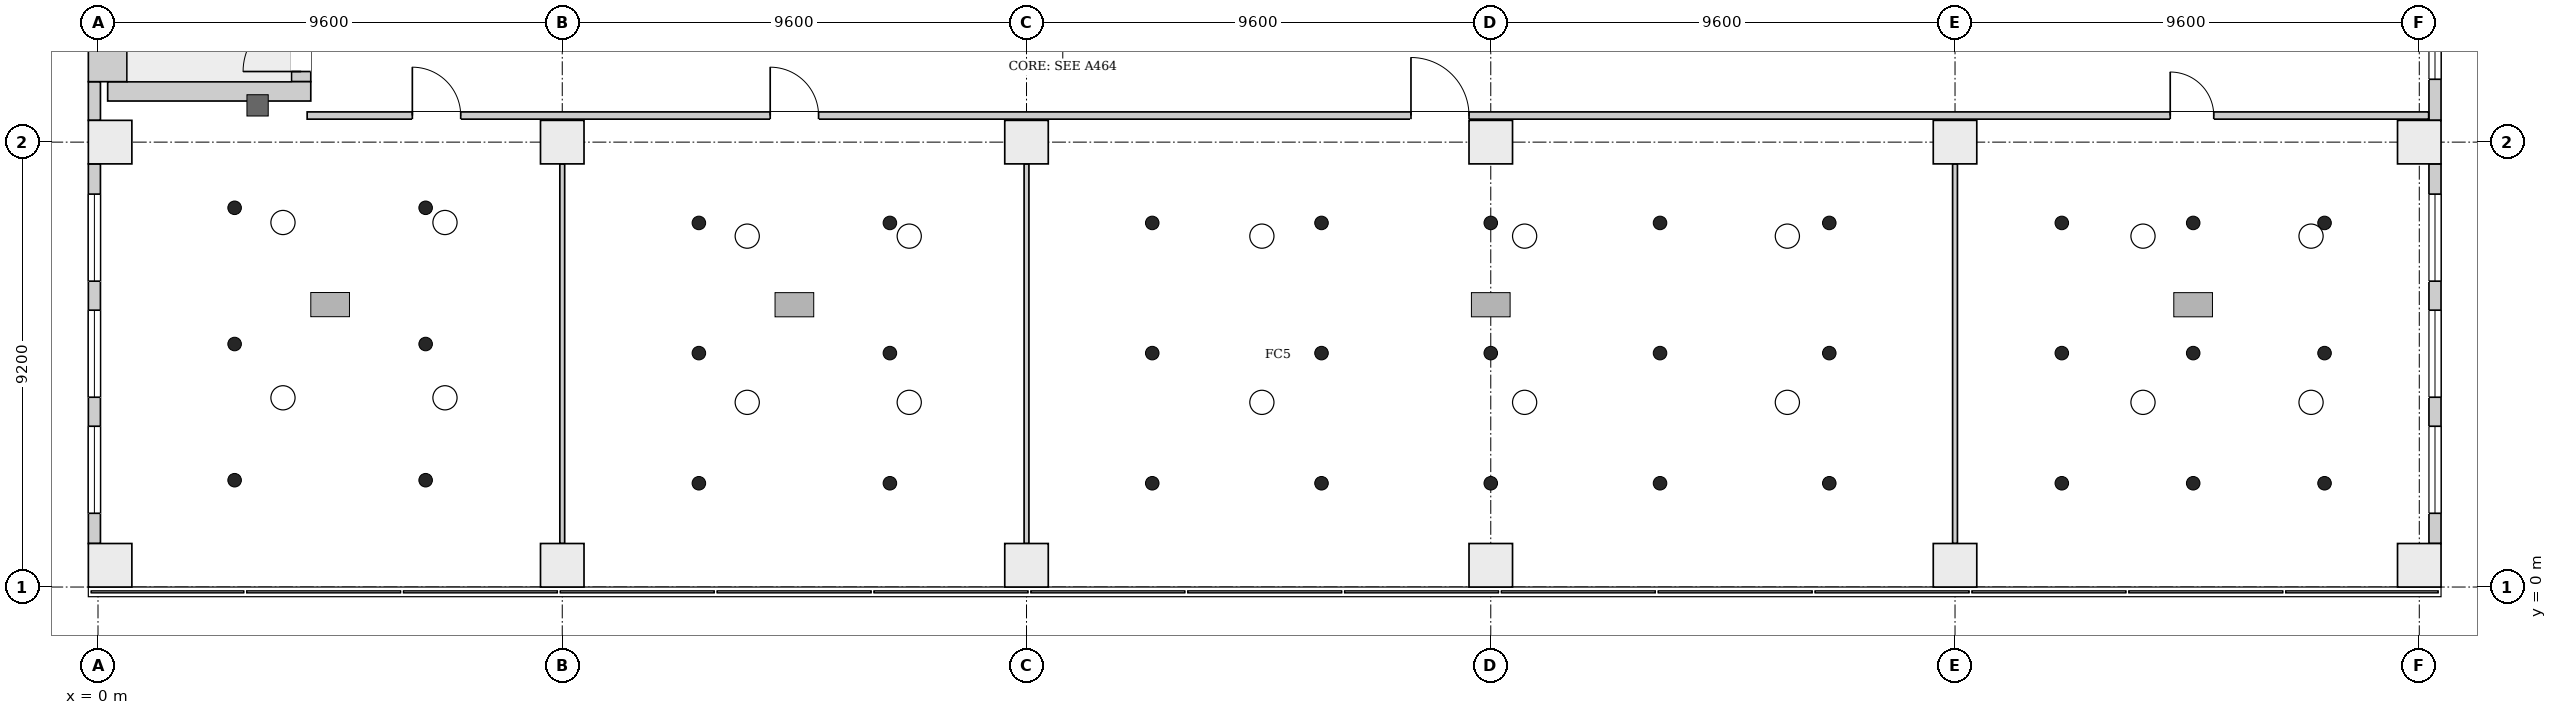
"""IFC4 building model, lengths in metres.
Left out: names, types, materials, properties, quantities, classifications, styles, units other than length and angle.
Written with IfcOpenShell. Run it as: python <this file> out.ifc"""

import sys

from ifc_helpers import new_model, si_unit, direction, frame, frame_2d, origin, origin_2d, place, context, subcontext, project, spatial, rectangle, extrude, element, fill, save


model = new_model("IFC4")
c1 = context("Model", 3, precision=1e-05, world=origin(), true_north=direction((0.0, 1.0)))
c2 = subcontext(c1, "Body", "Model", "MODEL_VIEW")
j1 = project(units=[si_unit("LENGTHUNIT", "METRE"), si_unit("PLANEANGLEUNIT", "RADIAN")], contexts=[c1])
p1 = place(None, origin())
s1 = spatial("IfcSite", under=j1, at=p1, CompositionType="ELEMENT")
p2 = place(p1, origin())
s2 = spatial("IfcBuilding", under=s1, at=p2, CompositionType="ELEMENT")
p3 = place(p2, frame((0.0, 0.0, 31.9)))
s3 = spatial("IfcBuildingStorey", under=s2, at=p3, CompositionType="ELEMENT", Elevation=31.9)
p4 = place(p3, frame((0.2, 10.25, 0.0), z_axis=(0.0, 0.0, 1.0), x_axis=(1.0, 0.0, 0.0)))
e1 = element("IfcWall", 1, at=p4, inside=s3, PredefinedType="SHEAR", context=c2, shape_type="SweptSolid", body=[
    extrude(rectangle(XDim=4.2, YDim=0.4, at=frame_2d((2.1, 0.0))), origin(), (0.0, 0.0, 1.0), 4.2),
])
p5 = place(p3, frame((0.2, 10.45, 0.0), z_axis=(0.0, 0.0, 1.0), x_axis=(0.0, 1.0, 0.0)))
e2 = element("IfcWall", 2, at=p5, inside=s3, PredefinedType="SHEAR", context=c2, shape_type="SweptSolid", body=[
    extrude(rectangle(XDim=6.6, YDim=0.8, at=frame_2d((3.3, 0.0))), origin(), (0.0, 0.0, 1.0), 4.2),
])
p6 = place(p3, frame((4.2, 10.45, 0.0), z_axis=(0.0, 0.0, 1.0), x_axis=(0.0, 1.0, 0.0)))
e3 = element("IfcWall", 3, at=p6, inside=s3, PredefinedType="SHEAR", context=c2, shape_type="SweptSolid", body=[
    extrude(rectangle(XDim=6.6, YDim=0.4, at=frame_2d((3.3, 0.0))), origin(), (0.0, 0.0, 1.0), 4.2),
])
p7 = place(p6, frame((0.21, 0.0, 0.0)))
e4 = element("IfcOpeningElement", 4, at=p7, cuts=e3, PredefinedType="OPENING", context=c2, shape_type="SweptSolid", body=[
    extrude(rectangle(XDim=1.2, YDim=2.1, at=frame_2d((0.6, 1.05))), frame((0.0, 0.21, 0.0), z_axis=(0.0, -1.0, 0.0), x_axis=(1.0, 0.0, 0.0)), (0.0, 0.0, 1.0), 0.42),
])
for number, where, z_axis, x_axis in (
    (5, (0.25, 0.45, 0.0), (0.0, 0.0, 1.0), (1.0, 0.0, 0.0)),
    (6, (9.6, 0.45, 0.0), (0.0, 0.0, 1.0), (1.0, 0.0, 0.0)),
    (7, (19.2, 0.45, 0.0), (0.0, 0.0, 1.0), (1.0, 0.0, 0.0)),
    (8, (28.8, 0.45, 0.0), (0.0, 0.0, 1.0), (1.0, 0.0, 0.0)),
    (9, (38.4, 0.45, 0.0), (0.0, 0.0, 1.0), (1.0, 0.0, 0.0)),
    (10, (48.0, 0.45, 0.0), (0.0, 0.0, 1.0), (1.0, 0.0, 0.0)),
    (11, (0.25, 9.2, 0.0), (0.0, 0.0, 1.0), (1.0, 0.0, 0.0)),
    (12, (9.6, 9.2, 0.0), (0.0, 0.0, 1.0), (1.0, 0.0, 0.0)),
    (13, (19.2, 9.2, 0.0), (0.0, 0.0, 1.0), (1.0, 0.0, 0.0)),
    (14, (28.8, 9.2, 0.0), (0.0, 0.0, 1.0), (1.0, 0.0, 0.0)),
    (15, (38.4, 9.2, 0.0), (0.0, 0.0, 1.0), (1.0, 0.0, 0.0)),
    (16, (48.0, 9.2, 0.0), (0.0, 0.0, 1.0), (1.0, 0.0, 0.0)),
):
    element("IfcColumn", number, at=place(p3, frame(where, z_axis=z_axis, x_axis=x_axis)), inside=s3, PredefinedType="COLUMN", context=c2, shape_type="SweptSolid", body=[
        extrude(rectangle(XDim=0.9, YDim=0.9, at=origin_2d()), origin(), (0.0, 0.0, 1.0), 4.2),
    ])
p8 = place(p3, frame((-0.074, 8.75, 0.0), z_axis=(0.0, 0.0, 1.0), x_axis=(0.0, -1.0, 0.0)))
e17 = element("IfcWall", 17, at=p8, inside=s3, PredefinedType="ELEMENTEDWALL", context=c2, shape_type="SweptSolid", body=[
    extrude(rectangle(XDim=7.85, YDim=0.25, at=frame_2d((3.925, 0.0))), origin(), (0.0, 0.0, 1.0), 3.9),
])
p9 = place(p8, frame((5.425, 0.0, 0.9)))
e18 = element("IfcOpeningElement", 18, at=p9, cuts=e17, PredefinedType="OPENING", context=c2, shape_type="SweptSolid", body=[
    extrude(rectangle(XDim=1.8, YDim=2.6, at=frame_2d((0.9, 1.3))), frame((0.0, 0.135, 0.0), z_axis=(0.0, -1.0, 0.0), x_axis=(1.0, 0.0, 0.0)), (0.0, 0.0, 1.0), 0.27),
])
p10 = place(p8, frame((3.025, 0.0, 0.9)))
e19 = element("IfcOpeningElement", 19, at=p10, cuts=e17, PredefinedType="OPENING", context=c2, shape_type="SweptSolid", body=[
    extrude(rectangle(XDim=1.8, YDim=2.6, at=frame_2d((0.9, 1.3))), frame((0.0, 0.135, 0.0), z_axis=(0.0, -1.0, 0.0), x_axis=(1.0, 0.0, 0.0)), (0.0, 0.0, 1.0), 0.27),
])
p11 = place(p8, frame((0.625, 0.0, 0.9)))
e20 = element("IfcOpeningElement", 20, at=p11, cuts=e17, PredefinedType="OPENING", context=c2, shape_type="SweptSolid", body=[
    extrude(rectangle(XDim=1.8, YDim=2.6, at=frame_2d((0.9, 1.3))), frame((0.0, 0.135, 0.0), z_axis=(0.0, -1.0, 0.0), x_axis=(1.0, 0.0, 0.0)), (0.0, 0.0, 1.0), 0.27),
])
p12 = place(p3, frame((-0.074, 10.45, 0.0), z_axis=(0.0, 0.0, 1.0), x_axis=(0.0, -1.0, 0.0)))
e21 = element("IfcWall", 21, at=p12, inside=s3, PredefinedType="ELEMENTEDWALL", context=c2, shape_type="SweptSolid", body=[
    extrude(rectangle(XDim=0.8, YDim=0.25, at=frame_2d((0.4, 0.0))), origin(), (0.0, 0.0, 1.0), 3.9),
])
p13 = place(p3, frame((48.325, 0.9, 0.0), z_axis=(0.0, 0.0, 1.0), x_axis=(0.0, 1.0, 0.0)))
e22 = element("IfcWall", 22, at=p13, inside=s3, PredefinedType="ELEMENTEDWALL", context=c2, shape_type="SweptSolid", body=[
    extrude(rectangle(XDim=7.85, YDim=0.25, at=frame_2d((3.925, 0.0))), origin(), (0.0, 0.0, 1.0), 3.9),
])
p14 = place(p13, frame((0.625, 0.0, 0.9)))
e23 = element("IfcOpeningElement", 23, at=p14, cuts=e22, PredefinedType="OPENING", context=c2, shape_type="SweptSolid", body=[
    extrude(rectangle(XDim=1.8, YDim=2.6, at=frame_2d((0.9, 1.3))), frame((0.0, 0.135, 0.0), z_axis=(0.0, -1.0, 0.0), x_axis=(1.0, 0.0, 0.0)), (0.0, 0.0, 1.0), 0.27),
])
p15 = place(p13, frame((3.025, 0.0, 0.9)))
e24 = element("IfcOpeningElement", 24, at=p15, cuts=e22, PredefinedType="OPENING", context=c2, shape_type="SweptSolid", body=[
    extrude(rectangle(XDim=1.8, YDim=2.6, at=frame_2d((0.9, 1.3))), frame((0.0, 0.135, 0.0), z_axis=(0.0, -1.0, 0.0), x_axis=(1.0, 0.0, 0.0)), (0.0, 0.0, 1.0), 0.27),
])
p16 = place(p13, frame((5.425, 0.0, 0.9)))
e25 = element("IfcOpeningElement", 25, at=p16, cuts=e22, PredefinedType="OPENING", context=c2, shape_type="SweptSolid", body=[
    extrude(rectangle(XDim=1.8, YDim=2.6, at=frame_2d((0.9, 1.3))), frame((0.0, 0.135, 0.0), z_axis=(0.0, -1.0, 0.0), x_axis=(1.0, 0.0, 0.0)), (0.0, 0.0, 1.0), 0.27),
])
p17 = place(p3, frame((48.325, 9.65, 0.0), z_axis=(0.0, 0.0, 1.0), x_axis=(0.0, 1.0, 0.0)))
e26 = element("IfcWall", 26, at=p17, inside=s3, PredefinedType="ELEMENTEDWALL", context=c2, shape_type="SweptSolid", body=[
    extrude(rectangle(XDim=8.3, YDim=0.25, at=frame_2d((4.15, 0.0))), origin(), (0.0, 0.0, 1.0), 3.9),
])
p18 = place(p17, frame((3.25, 0.0, 0.0)))
e27 = element("IfcOpeningElement", 27, at=p18, cuts=e26, PredefinedType="OPENING", context=c2, shape_type="SweptSolid", body=[
    extrude(rectangle(XDim=1.8, YDim=2.4, at=frame_2d((0.9, 1.2))), frame((0.0, 0.135, 0.0), z_axis=(0.0, -1.0, 0.0), x_axis=(1.0, 0.0, 0.0)), (0.0, 0.0, 1.0), 0.27),
])
p19 = place(p17, frame((0.85, 0.0, 0.9)))
e28 = element("IfcOpeningElement", 28, at=p19, cuts=e26, PredefinedType="OPENING", context=c2, shape_type="SweptSolid", body=[
    extrude(rectangle(XDim=1.8, YDim=2.6, at=frame_2d((0.9, 1.3))), frame((0.0, 0.135, 0.0), z_axis=(0.0, -1.0, 0.0), x_axis=(1.0, 0.0, 0.0)), (0.0, 0.0, 1.0), 0.27),
])
p20 = place(p17, frame((5.65, 0.0, 0.9)))
e29 = element("IfcOpeningElement", 29, at=p20, cuts=e26, PredefinedType="OPENING", context=c2, shape_type="SweptSolid", body=[
    extrude(rectangle(XDim=1.8, YDim=2.6, at=frame_2d((0.9, 1.3))), frame((0.0, 0.135, 0.0), z_axis=(0.0, -1.0, 0.0), x_axis=(1.0, 0.0, 0.0)), (0.0, 0.0, 1.0), 0.27),
])
p21 = place(p3, frame((4.325, 9.75, 0.0), z_axis=(0.0, 0.0, 1.0), x_axis=(1.0, 0.0, 0.0)))
e30 = element("IfcWall", 30, at=p21, inside=s3, PredefinedType="PARTITIONING", context=c2, shape_type="SweptSolid", body=[
    extrude(rectangle(XDim=43.869, YDim=0.15, at=frame_2d((21.935, 0.0))), origin(), (0.0, 0.0, 1.0), 3.9),
])
p22 = place(p21, frame((2.175, 0.0, 0.0)))
e31 = element("IfcOpeningElement", 31, at=p22, cuts=e30, PredefinedType="OPENING", context=c2, shape_type="SweptSolid", body=[
    extrude(rectangle(XDim=1.0, YDim=2.1, at=frame_2d((0.5, 1.05))), frame((0.0, 0.085, 0.0), z_axis=(0.0, -1.0, 0.0), x_axis=(1.0, 0.0, 0.0)), (0.0, 0.0, 1.0), 0.17),
])
p23 = place(p21, frame((9.575, 0.0, 0.0)))
e32 = element("IfcOpeningElement", 32, at=p23, cuts=e30, PredefinedType="OPENING", context=c2, shape_type="SweptSolid", body=[
    extrude(rectangle(XDim=1.0, YDim=2.1, at=frame_2d((0.5, 1.05))), frame((0.0, 0.085, 0.0), z_axis=(0.0, -1.0, 0.0), x_axis=(1.0, 0.0, 0.0)), (0.0, 0.0, 1.0), 0.17),
])
p24 = place(p21, frame((22.825, 0.0, 0.0)))
e33 = element("IfcOpeningElement", 33, at=p24, cuts=e30, PredefinedType="OPENING", context=c2, shape_type="SweptSolid", body=[
    extrude(rectangle(XDim=1.2, YDim=2.1, at=frame_2d((0.6, 1.05))), frame((0.0, 0.085, 0.0), z_axis=(0.0, -1.0, 0.0), x_axis=(1.0, 0.0, 0.0)), (0.0, 0.0, 1.0), 0.17),
])
p25 = place(p21, frame((38.525, 0.0, 0.0)))
e34 = element("IfcOpeningElement", 34, at=p25, cuts=e30, PredefinedType="OPENING", context=c2, shape_type="SweptSolid", body=[
    extrude(rectangle(XDim=0.9, YDim=2.1, at=frame_2d((0.45, 1.05))), frame((0.0, 0.085, 0.0), z_axis=(0.0, -1.0, 0.0), x_axis=(1.0, 0.0, 0.0)), (0.0, 0.0, 1.0), 0.17),
])
for number, where, z_axis, x_axis in (
    (35, (9.6, 0.9, 0.0), (0.0, 0.0, 1.0), (0.0, 1.0, 0.0)),
    (36, (19.2, 0.9, 0.0), (0.0, 0.0, 1.0), (0.0, 1.0, 0.0)),
    (37, (38.4, 0.9, 0.0), (0.0, 0.0, 1.0), (0.0, 1.0, 0.0)),
):
    element("IfcWall", number, at=place(p3, frame(where, z_axis=z_axis, x_axis=x_axis)), inside=s3, PredefinedType="PARTITIONING", context=c2, shape_type="SweptSolid", body=[
        extrude(rectangle(XDim=7.85, YDim=0.1, at=frame_2d((3.925, 0.0))), origin(), (0.0, 0.0, 1.0), 3.9),
    ])
p26 = place(p9, origin())
e38 = element("IfcWindow", 38, at=p26, inside=s3, PartitioningType="SINGLE_PANEL", PredefinedType="WINDOW", context=c2, shape_type="SweptSolid", body=[
    extrude(rectangle(XDim=1.8, YDim=2.6, at=frame_2d((0.9, 1.3))), frame((0.0, 0.03, 0.0), z_axis=(0.0, -1.0, 0.0), x_axis=(1.0, 0.0, 0.0)), (0.0, 0.0, 1.0), 0.06),
])
fill(e18, e38)
p27 = place(p10, origin())
e39 = element("IfcWindow", 39, at=p27, inside=s3, PartitioningType="SINGLE_PANEL", PredefinedType="WINDOW", context=c2, shape_type="SweptSolid", body=[
    extrude(rectangle(XDim=1.8, YDim=2.6, at=frame_2d((0.9, 1.3))), frame((0.0, 0.03, 0.0), z_axis=(0.0, -1.0, 0.0), x_axis=(1.0, 0.0, 0.0)), (0.0, 0.0, 1.0), 0.06),
])
fill(e19, e39)
p28 = place(p11, origin())
e40 = element("IfcWindow", 40, at=p28, inside=s3, PartitioningType="SINGLE_PANEL", PredefinedType="WINDOW", context=c2, shape_type="SweptSolid", body=[
    extrude(rectangle(XDim=1.8, YDim=2.6, at=frame_2d((0.9, 1.3))), frame((0.0, 0.03, 0.0), z_axis=(0.0, -1.0, 0.0), x_axis=(1.0, 0.0, 0.0)), (0.0, 0.0, 1.0), 0.06),
])
fill(e20, e40)
p29 = place(p14, origin())
e41 = element("IfcWindow", 41, at=p29, inside=s3, PartitioningType="SINGLE_PANEL", PredefinedType="WINDOW", context=c2, shape_type="SweptSolid", body=[
    extrude(rectangle(XDim=1.8, YDim=2.6, at=frame_2d((0.9, 1.3))), frame((0.0, 0.03, 0.0), z_axis=(0.0, -1.0, 0.0), x_axis=(1.0, 0.0, 0.0)), (0.0, 0.0, 1.0), 0.06),
])
fill(e23, e41)
p30 = place(p15, origin())
e42 = element("IfcWindow", 42, at=p30, inside=s3, PartitioningType="SINGLE_PANEL", PredefinedType="WINDOW", context=c2, shape_type="SweptSolid", body=[
    extrude(rectangle(XDim=1.8, YDim=2.6, at=frame_2d((0.9, 1.3))), frame((0.0, 0.03, 0.0), z_axis=(0.0, -1.0, 0.0), x_axis=(1.0, 0.0, 0.0)), (0.0, 0.0, 1.0), 0.06),
])
fill(e24, e42)
p31 = place(p16, origin())
e43 = element("IfcWindow", 43, at=p31, inside=s3, PartitioningType="SINGLE_PANEL", PredefinedType="WINDOW", context=c2, shape_type="SweptSolid", body=[
    extrude(rectangle(XDim=1.8, YDim=2.6, at=frame_2d((0.9, 1.3))), frame((0.0, 0.03, 0.0), z_axis=(0.0, -1.0, 0.0), x_axis=(1.0, 0.0, 0.0)), (0.0, 0.0, 1.0), 0.06),
])
fill(e25, e43)
p32 = place(p19, origin())
e44 = element("IfcWindow", 44, at=p32, inside=s3, PartitioningType="SINGLE_PANEL", PredefinedType="WINDOW", context=c2, shape_type="SweptSolid", body=[
    extrude(rectangle(XDim=1.8, YDim=2.6, at=frame_2d((0.9, 1.3))), frame((0.0, 0.03, 0.0), z_axis=(0.0, -1.0, 0.0), x_axis=(1.0, 0.0, 0.0)), (0.0, 0.0, 1.0), 0.06),
])
fill(e28, e44)
p33 = place(p7, origin())
e45 = element("IfcDoor", 45, at=p33, inside=s3, OperationType="SINGLE_SWING_RIGHT", PredefinedType="DOOR", context=c2, shape_type="SweptSolid", body=[
    extrude(rectangle(XDim=1.2, YDim=2.1, at=frame_2d((0.6, 1.05))), frame((0.0, 0.025, 0.0), z_axis=(0.0, -1.0, 0.0), x_axis=(1.0, 0.0, 0.0)), (0.0, 0.0, 1.0), 0.05),
])
fill(e4, e45)
p34 = place(p22, origin())
e46 = element("IfcDoor", 46, at=p34, inside=s3, OperationType="SINGLE_SWING_RIGHT", PredefinedType="DOOR", context=c2, shape_type="SweptSolid", body=[
    extrude(rectangle(XDim=1.0, YDim=2.1, at=frame_2d((0.5, 1.05))), frame((0.0, 0.025, 0.0), z_axis=(0.0, -1.0, 0.0), x_axis=(1.0, 0.0, 0.0)), (0.0, 0.0, 1.0), 0.05),
])
fill(e31, e46)
p35 = place(p23, origin())
e47 = element("IfcDoor", 47, at=p35, inside=s3, OperationType="SINGLE_SWING_RIGHT", PredefinedType="DOOR", context=c2, shape_type="SweptSolid", body=[
    extrude(rectangle(XDim=1.0, YDim=2.1, at=frame_2d((0.5, 1.05))), frame((0.0, 0.025, 0.0), z_axis=(0.0, -1.0, 0.0), x_axis=(1.0, 0.0, 0.0)), (0.0, 0.0, 1.0), 0.05),
])
fill(e32, e47)
p36 = place(p24, origin())
e48 = element("IfcDoor", 48, at=p36, inside=s3, OperationType="SINGLE_SWING_LEFT", PredefinedType="DOOR", context=c2, shape_type="SweptSolid", body=[
    extrude(rectangle(XDim=1.2, YDim=2.1, at=frame_2d((0.6, 1.05))), frame((0.0, 0.025, 0.0), z_axis=(0.0, -1.0, 0.0), x_axis=(1.0, 0.0, 0.0)), (0.0, 0.0, 1.0), 0.05),
])
fill(e33, e48)
p37 = place(p25, origin())
e49 = element("IfcDoor", 49, at=p37, inside=s3, OperationType="SINGLE_SWING_LEFT", PredefinedType="DOOR", context=c2, shape_type="SweptSolid", body=[
    extrude(rectangle(XDim=0.9, YDim=2.1, at=frame_2d((0.45, 1.05))), frame((0.0, 0.025, 0.0), z_axis=(0.0, -1.0, 0.0), x_axis=(1.0, 0.0, 0.0)), (0.0, 0.0, 1.0), 0.05),
])
fill(e34, e49)
save(model, sys.argv[1])
